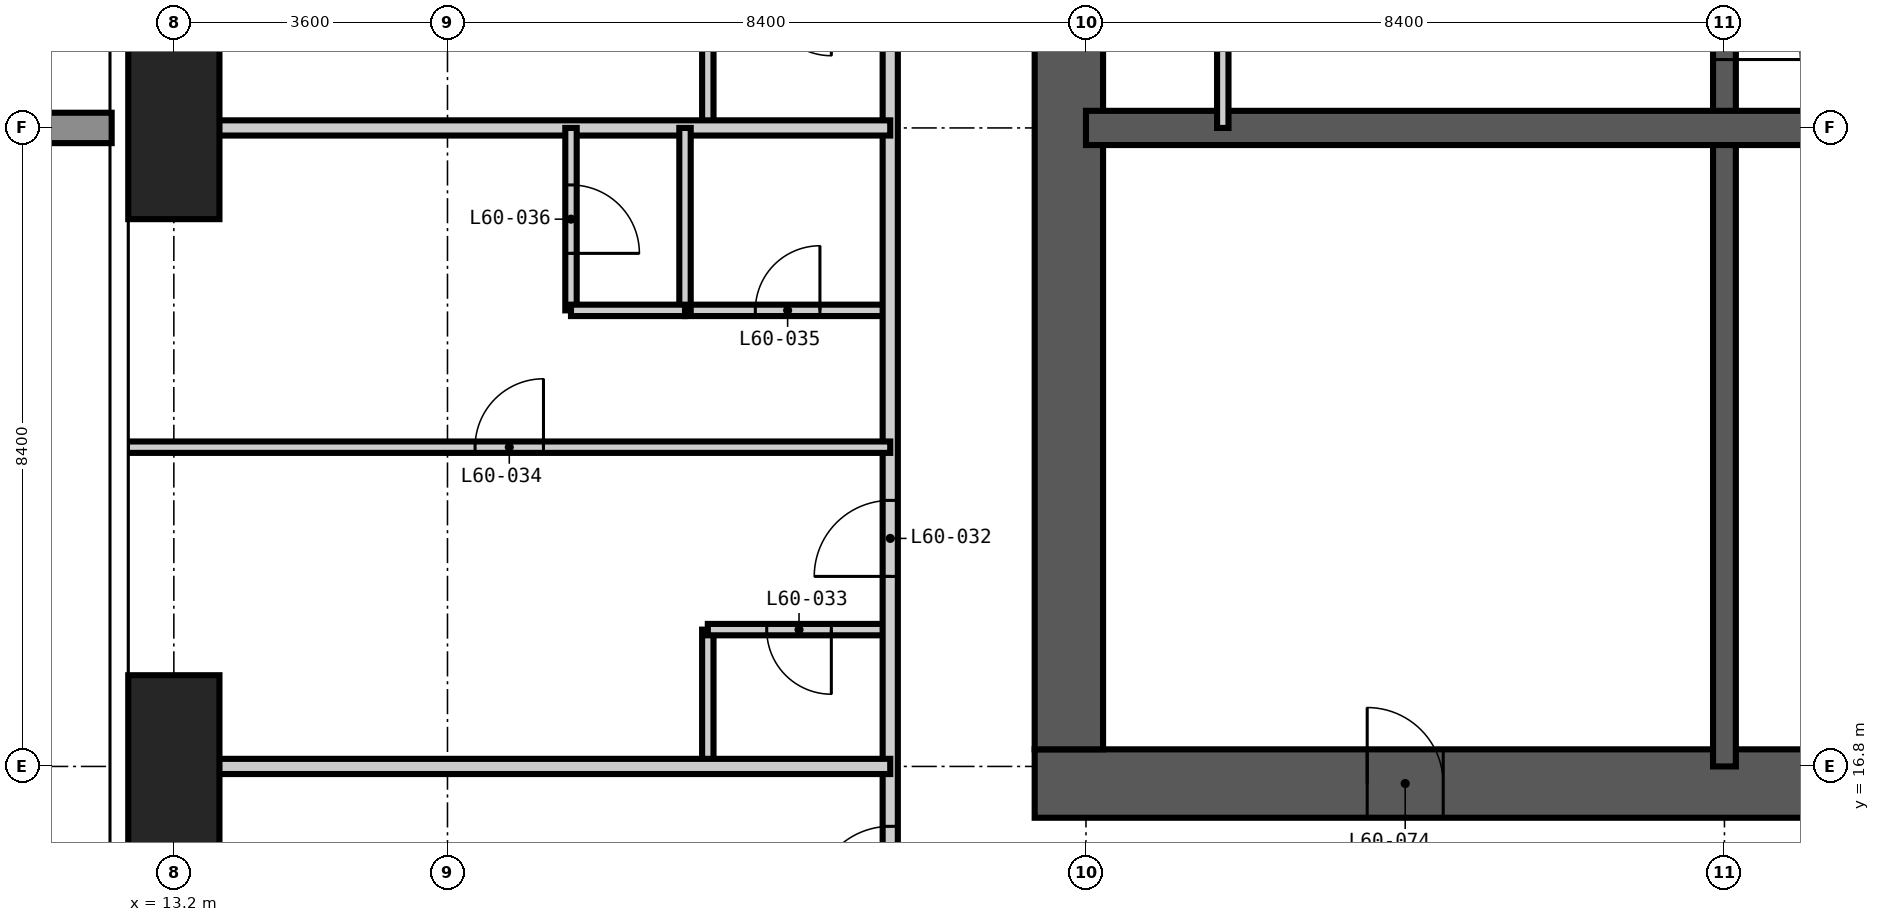
"""IFC4 building model, lengths in metres.
Left out: names, types, materials, properties, quantities, classifications, styles, units other than length and angle.
Written with IfcOpenShell. Run it as: python <this file> out.ifc"""

import sys

from ifc_helpers import new_model, si_unit, direction, frame, frame_2d, origin, origin_2d, place, context, subcontext, project, spatial, rectangle, extrude, element, fill, save


model = new_model("IFC4")
c1 = context("Model", 3, precision=1e-05, world=origin(), true_north=direction((0.0, 1.0)))
c2 = subcontext(c1, "Body", "Model", "MODEL_VIEW")
j1 = project(units=[si_unit("LENGTHUNIT", "METRE"), si_unit("PLANEANGLEUNIT", "RADIAN")], contexts=[c1])
p1 = place(None, origin())
s1 = spatial("IfcSite", under=j1, at=p1, CompositionType="ELEMENT")
p2 = place(p1, origin())
s2 = spatial("IfcBuilding", under=s1, at=p2, CompositionType="ELEMENT")
p3 = place(p2, frame((0.0, 0.0, 233.4)))
s3 = spatial("IfcBuildingStorey", under=s2, at=p3, CompositionType="ELEMENT", Elevation=233.4)
for number, where, z_axis, x_axis in (
    (1, (13.2, 16.8, -0.35), (0.0, 0.0, 1.0), (1.0, 0.0, 0.0)),
    (2, (13.2, 25.2, -0.35), (0.0, 0.0, 1.0), (1.0, 0.0, 0.0)),
):
    element("IfcColumn", number, at=place(p3, frame(where, z_axis=z_axis, x_axis=x_axis)), inside=s3, PredefinedType="COLUMN", context=c2, shape_type="SweptSolid", body=[
        extrude(rectangle(XDim=1.2, YDim=2.4, at=origin_2d()), origin(), (0.0, 0.0, 1.0), 3.9),
    ])
p4 = place(p3, frame((24.525, 16.575, -0.35), z_axis=(0.0, 0.0, 1.0), x_axis=(1.0, 0.0, 0.0)))
e3 = element("IfcWall", 3, at=p4, inside=s3, PredefinedType="SHEAR", context=c2, shape_type="SweptSolid", body=[
    extrude(rectangle(XDim=18.15, YDim=0.9, at=frame_2d((9.075, 0.0))), origin(), (0.0, 0.0, 1.0), 3.9),
])
p5 = place(p4, frame((4.375, 0.0, 0.35)))
e4 = element("IfcOpeningElement", 4, at=p5, cuts=e3, PredefinedType="OPENING", context=c2, shape_type="SweptSolid", body=[
    extrude(rectangle(XDim=1.0, YDim=2.1, at=frame_2d((0.5, 1.05))), frame((0.0, 0.46, 0.0), z_axis=(0.0, -1.0, 0.0), x_axis=(1.0, 0.0, 0.0)), (0.0, 0.0, 1.0), 0.92),
])
p6 = place(p4, frame((10.675, 0.0, 0.35)))
e5 = element("IfcOpeningElement", 5, at=p6, cuts=e3, PredefinedType="OPENING", context=c2, shape_type="SweptSolid", body=[
    extrude(rectangle(XDim=1.0, YDim=2.1, at=frame_2d((0.5, 1.05))), frame((0.0, 0.46, 0.0), z_axis=(0.0, -1.0, 0.0), x_axis=(1.0, 0.0, 0.0)), (0.0, 0.0, 1.0), 0.92),
])
p7 = place(p3, frame((24.975, 41.775, -0.35), z_axis=(0.0, 0.0, 1.0), x_axis=(0.0, -1.0, 0.0)))
e6 = element("IfcWall", 6, at=p7, inside=s3, PredefinedType="SHEAR", context=c2, shape_type="SweptSolid", body=[
    extrude(rectangle(XDim=24.75, YDim=0.9, at=frame_2d((12.375, 0.0))), origin(), (0.0, 0.0, 1.0), 3.9),
])
p8 = place(p7, frame((11.875, 0.0, 0.35)))
e7 = element("IfcOpeningElement", 7, at=p8, cuts=e6, PredefinedType="OPENING", context=c2, shape_type="SweptSolid", body=[
    extrude(rectangle(XDim=1.0, YDim=2.1, at=frame_2d((0.5, 1.05))), frame((0.0, 0.46, 0.0), z_axis=(0.0, -1.0, 0.0), x_axis=(1.0, 0.0, 0.0)), (0.0, 0.0, 1.0), 0.92),
])
p9 = place(p3, frame((33.6, 16.8, -0.35), z_axis=(0.0, 0.0, 1.0), x_axis=(0.0, 1.0, 0.0)))
e8 = element("IfcWall", 8, at=p9, inside=s3, PredefinedType="SHEAR", context=c2, shape_type="SweptSolid", body=[
    extrude(rectangle(XDim=25.2, YDim=0.3, at=frame_2d((12.6, 0.0))), origin(), (0.0, 0.0, 1.0), 3.9),
])
p10 = place(p9, frame((22.5, 0.0, 0.35)))
e9 = element("IfcOpeningElement", 9, at=p10, cuts=e8, PredefinedType="OPENING", context=c2, shape_type="SweptSolid", body=[
    extrude(rectangle(XDim=1.2, YDim=2.2, at=frame_2d((0.6, 1.1))), frame((0.0, 0.16, 0.0), z_axis=(0.0, -1.0, 0.0), x_axis=(1.0, 0.0, 0.0)), (0.0, 0.0, 1.0), 0.32),
])
p11 = place(p9, frame((18.3, 0.0, 0.35)))
e10 = element("IfcOpeningElement", 10, at=p11, cuts=e8, PredefinedType="OPENING", context=c2, shape_type="SweptSolid", body=[
    extrude(rectangle(XDim=1.2, YDim=2.2, at=frame_2d((0.6, 1.1))), frame((0.0, 0.16, 0.0), z_axis=(0.0, -1.0, 0.0), x_axis=(1.0, 0.0, 0.0)), (0.0, 0.0, 1.0), 0.32),
])
p12 = place(p9, frame((9.3, 0.0, 0.35)))
e11 = element("IfcOpeningElement", 11, at=p12, cuts=e8, PredefinedType="OPENING", context=c2, shape_type="SweptSolid", body=[
    extrude(rectangle(XDim=1.0, YDim=2.1, at=frame_2d((0.5, 1.05))), frame((0.0, 0.16, 0.0), z_axis=(0.0, -1.0, 0.0), x_axis=(1.0, 0.0, 0.0)), (0.0, 0.0, 1.0), 0.32),
])
p13 = place(p3, frame((25.2, 25.2, -0.35), z_axis=(0.0, 0.0, 1.0), x_axis=(1.0, 0.0, 0.0)))
e12 = element("IfcWall", 12, at=p13, inside=s3, PredefinedType="SHEAR", context=c2, shape_type="SweptSolid", body=[
    extrude(rectangle(XDim=16.8, YDim=0.45, at=frame_2d((8.4, 0.0))), origin(), (0.0, 0.0, 1.0), 3.9),
])
for number, where, z_axis, x_axis in (
    (13, (20.225, 16.8, 0.0), (0.0, 0.0, 1.0), (0.0, 1.0, 0.0)),
    (14, (20.225, 25.2, 0.0), (0.0, 0.0, 1.0), (0.0, 1.0, 0.0)),
):
    element("IfcWall", number, at=place(p3, frame(where, z_axis=z_axis, x_axis=x_axis)), inside=s3, PredefinedType="PARTITIONING", context=c2, shape_type="SweptSolid", body=[
        extrude(rectangle(XDim=1.8, YDim=0.15, at=frame_2d((0.9, 0.0))), origin(), (0.0, 0.0, 1.0), 3.55),
    ])
p14 = place(p3, frame((20.225, 18.6, 0.0), z_axis=(0.0, 0.0, 1.0), x_axis=(1.0, 0.0, 0.0)))
e15 = element("IfcWall", 15, at=p14, inside=s3, PredefinedType="PARTITIONING", context=c2, shape_type="SweptSolid", body=[
    extrude(rectangle(XDim=2.4, YDim=0.15, at=frame_2d((1.2, 0.0))), origin(), (0.0, 0.0, 1.0), 3.55),
])
p15 = place(p14, frame((0.775, 0.0, 0.0)))
e16 = element("IfcOpeningElement", 16, at=p15, cuts=e15, PredefinedType="OPENING", context=c2, shape_type="SweptSolid", body=[
    extrude(rectangle(XDim=0.85, YDim=2.1, at=frame_2d((0.425, 1.05))), frame((0.0, 0.085, 0.0), z_axis=(0.0, -1.0, 0.0), x_axis=(1.0, 0.0, 0.0)), (0.0, 0.0, 1.0), 0.17),
])
p16 = place(p3, frame((19.925, 22.8, 0.0), z_axis=(0.0, 0.0, 1.0), x_axis=(1.0, 0.0, 0.0)))
e17 = element("IfcWall", 17, at=p16, inside=s3, PredefinedType="PARTITIONING", context=c2, shape_type="SweptSolid", body=[
    extrude(rectangle(XDim=2.7, YDim=0.15, at=frame_2d((1.35, 0.0))), origin(), (0.0, 0.0, 1.0), 3.55),
])
p17 = place(p16, frame((0.925, 0.0, 0.0)))
e18 = element("IfcOpeningElement", 18, at=p17, cuts=e17, PredefinedType="OPENING", context=c2, shape_type="SweptSolid", body=[
    extrude(rectangle(XDim=0.85, YDim=2.1, at=frame_2d((0.425, 1.05))), frame((0.0, 0.085, 0.0), z_axis=(0.0, -1.0, 0.0), x_axis=(1.0, 0.0, 0.0)), (0.0, 0.0, 1.0), 0.17),
])
p18 = place(p3, frame((22.625, 14.225, 0.0), z_axis=(0.0, 0.0, 1.0), x_axis=(0.0, 1.0, 0.0)))
e19 = element("IfcWall", 19, at=p18, inside=s3, PredefinedType="PARTITIONING", context=c2, shape_type="SweptSolid", body=[
    extrude(rectangle(XDim=30.95, YDim=0.2, at=frame_2d((15.475, 0.0))), origin(), (0.0, 0.0, 1.0), 3.55),
])
p19 = place(p18, frame((5.075, 0.0, 0.0)))
e20 = element("IfcOpeningElement", 20, at=p19, cuts=e19, PredefinedType="OPENING", context=c2, shape_type="SweptSolid", body=[
    extrude(rectangle(XDim=1.0, YDim=2.2, at=frame_2d((0.5, 1.1))), frame((0.0, 0.11, 0.0), z_axis=(0.0, -1.0, 0.0), x_axis=(1.0, 0.0, 0.0)), (0.0, 0.0, 1.0), 0.22),
])
p20 = place(p18, frame((13.475, 0.0, 0.0)))
e21 = element("IfcOpeningElement", 21, at=p20, cuts=e19, PredefinedType="OPENING", context=c2, shape_type="SweptSolid", body=[
    extrude(rectangle(XDim=1.0, YDim=2.2, at=frame_2d((0.5, 1.1))), frame((0.0, 0.11, 0.0), z_axis=(0.0, -1.0, 0.0), x_axis=(1.0, 0.0, 0.0)), (0.0, 0.0, 1.0), 0.22),
])
p21 = place(p18, frame((21.875, 0.0, 0.0)))
e22 = element("IfcOpeningElement", 22, at=p21, cuts=e19, PredefinedType="OPENING", context=c2, shape_type="SweptSolid", body=[
    extrude(rectangle(XDim=1.0, YDim=2.2, at=frame_2d((0.5, 1.1))), frame((0.0, 0.11, 0.0), z_axis=(0.0, -1.0, 0.0), x_axis=(1.0, 0.0, 0.0)), (0.0, 0.0, 1.0), 0.22),
])
p22 = place(p18, frame((0.787, 0.0, 0.0)))
e23 = element("IfcOpeningElement", 23, at=p22, cuts=e19, PredefinedType="OPENING", context=c2, shape_type="SweptSolid", body=[
    extrude(rectangle(XDim=1.0, YDim=2.2, at=frame_2d((0.5, 1.1))), frame((0.0, 0.11, 0.0), z_axis=(0.0, -1.0, 0.0), x_axis=(1.0, 0.0, 0.0)), (0.0, 0.0, 1.0), 0.22),
])
p23 = place(p18, frame((28.862, 0.0, 0.0)))
e24 = element("IfcOpeningElement", 24, at=p23, cuts=e19, PredefinedType="OPENING", context=c2, shape_type="SweptSolid", body=[
    extrude(rectangle(XDim=1.0, YDim=2.2, at=frame_2d((0.5, 1.1))), frame((0.0, 0.11, 0.0), z_axis=(0.0, -1.0, 0.0), x_axis=(1.0, 0.0, 0.0)), (0.0, 0.0, 1.0), 0.22),
])
for number, where, z_axis, x_axis in (
    (25, (12.582, 16.8, 0.0), (0.0, 0.0, 1.0), (1.0, 0.0, 0.0)),
    (26, (12.582, 25.2, 0.0), (0.0, 0.0, 1.0), (1.0, 0.0, 0.0)),
):
    element("IfcWall", number, at=place(p3, frame(where, z_axis=z_axis, x_axis=x_axis)), inside=s3, PredefinedType="PARTITIONING", context=c2, shape_type="SweptSolid", body=[
        extrude(rectangle(XDim=10.043, YDim=0.2, at=frame_2d((5.021, 0.0))), origin(), (0.0, 0.0, 1.0), 3.55),
    ])
p24 = place(p3, frame((18.425, 22.8, 0.0), z_axis=(0.0, 0.0, 1.0), x_axis=(0.0, 1.0, 0.0)))
e27 = element("IfcWall", 27, at=p24, inside=s3, PredefinedType="PARTITIONING", context=c2, shape_type="SweptSolid", body=[
    extrude(rectangle(XDim=2.4, YDim=0.15, at=frame_2d((1.2, 0.0))), origin(), (0.0, 0.0, 1.0), 3.55),
])
p25 = place(p24, frame((0.75, 0.0, 0.0)))
e28 = element("IfcOpeningElement", 28, at=p25, cuts=e27, PredefinedType="OPENING", context=c2, shape_type="SweptSolid", body=[
    extrude(rectangle(XDim=0.9, YDim=2.1, at=frame_2d((0.45, 1.05))), frame((0.0, 0.085, 0.0), z_axis=(0.0, -1.0, 0.0), x_axis=(1.0, 0.0, 0.0)), (0.0, 0.0, 1.0), 0.17),
])
p26 = place(p3, frame((19.925, 22.8, 0.0), z_axis=(0.0, 0.0, 1.0), x_axis=(0.0, 1.0, 0.0)))
e29 = element("IfcWall", 29, at=p26, inside=s3, PredefinedType="PARTITIONING", context=c2, shape_type="SweptSolid", body=[
    extrude(rectangle(XDim=2.4, YDim=0.15, at=frame_2d((1.2, 0.0))), origin(), (0.0, 0.0, 1.0), 3.55),
])
p27 = place(p3, frame((27.0, 25.2, 0.0), z_axis=(0.0, 0.0, 1.0), x_axis=(0.0, 1.0, 0.0)))
e30 = element("IfcWall", 30, at=p27, inside=s3, PredefinedType="PARTITIONING", context=c2, shape_type="SweptSolid", body=[
    extrude(rectangle(XDim=8.4, YDim=0.15, at=frame_2d((4.2, 0.0))), origin(), (0.0, 0.0, 1.0), 3.55),
])
p28 = place(p27, frame((1.6, 0.0, 0.0)))
e31 = element("IfcOpeningElement", 31, at=p28, cuts=e30, PredefinedType="OPENING", context=c2, shape_type="SweptSolid", body=[
    extrude(rectangle(XDim=1.0, YDim=2.1, at=frame_2d((0.5, 1.05))), frame((0.0, 0.085, 0.0), z_axis=(0.0, -1.0, 0.0), x_axis=(1.0, 0.0, 0.0)), (0.0, 0.0, 1.0), 0.17),
])
p29 = place(p27, frame((5.8, 0.0, 0.0)))
e32 = element("IfcOpeningElement", 32, at=p29, cuts=e30, PredefinedType="OPENING", context=c2, shape_type="SweptSolid", body=[
    extrude(rectangle(XDim=1.0, YDim=2.1, at=frame_2d((0.5, 1.05))), frame((0.0, 0.085, 0.0), z_axis=(0.0, -1.0, 0.0), x_axis=(1.0, 0.0, 0.0)), (0.0, 0.0, 1.0), 0.17),
])
p30 = place(p3, frame((12.582, 21.0, 0.0), z_axis=(0.0, 0.0, 1.0), x_axis=(1.0, 0.0, 0.0)))
e33 = element("IfcWall", 33, at=p30, inside=s3, PredefinedType="PARTITIONING", context=c2, shape_type="SweptSolid", body=[
    extrude(rectangle(XDim=10.043, YDim=0.15, at=frame_2d((5.021, 0.0))), origin(), (0.0, 0.0, 1.0), 3.55),
])
p31 = place(p30, frame((4.581, 0.0, 0.0)))
e34 = element("IfcOpeningElement", 34, at=p31, cuts=e33, PredefinedType="OPENING", context=c2, shape_type="SweptSolid", body=[
    extrude(rectangle(XDim=0.9, YDim=2.1, at=frame_2d((0.45, 1.05))), frame((0.0, 0.085, 0.0), z_axis=(0.0, -1.0, 0.0), x_axis=(1.0, 0.0, 0.0)), (0.0, 0.0, 1.0), 0.17),
])
p32 = place(p3, frame((18.425, 22.8, 0.0), z_axis=(0.0, 0.0, 1.0), x_axis=(1.0, 0.0, 0.0)))
e35 = element("IfcWall", 35, at=p32, inside=s3, PredefinedType="PARTITIONING", context=c2, shape_type="SweptSolid", body=[
    extrude(rectangle(XDim=1.5, YDim=0.15, at=frame_2d((0.75, 0.0))), origin(), (0.0, 0.0, 1.0), 3.55),
])
p33 = place(p19, origin())
e36 = element("IfcDoor", 36, at=p33, inside=s3, OperationType="SINGLE_SWING_LEFT", PredefinedType="DOOR", context=c2, shape_type="SweptSolid", body=[
    extrude(rectangle(XDim=1.0, YDim=2.2, at=frame_2d((0.5, 1.1))), frame((0.0, 0.025, 0.0), z_axis=(0.0, -1.0, 0.0), x_axis=(1.0, 0.0, 0.0)), (0.0, 0.0, 1.0), 0.05),
])
fill(e20, e36)
p34 = place(p15, frame((0.85, 0.0, 0.0), z_axis=(0.0, 0.0, 1.0), x_axis=(-1.0, 0.0, 0.0)))
e37 = element("IfcDoor", 37, at=p34, inside=s3, OperationType="SINGLE_SWING_LEFT", PredefinedType="DOOR", context=c2, shape_type="SweptSolid", body=[
    extrude(rectangle(XDim=0.85, YDim=2.1, at=frame_2d((0.425, 1.05))), frame((0.0, 0.025, 0.0), z_axis=(0.0, -1.0, 0.0), x_axis=(1.0, 0.0, 0.0)), (0.0, 0.0, 1.0), 0.05),
])
fill(e16, e37)
p35 = place(p31, origin())
e38 = element("IfcDoor", 38, at=p35, inside=s3, OperationType="SINGLE_SWING_RIGHT", PredefinedType="DOOR", context=c2, shape_type="SweptSolid", body=[
    extrude(rectangle(XDim=0.9, YDim=2.1, at=frame_2d((0.45, 1.05))), frame((0.0, 0.025, 0.0), z_axis=(0.0, -1.0, 0.0), x_axis=(1.0, 0.0, 0.0)), (0.0, 0.0, 1.0), 0.05),
])
fill(e34, e38)
p36 = place(p17, origin())
e39 = element("IfcDoor", 39, at=p36, inside=s3, OperationType="SINGLE_SWING_RIGHT", PredefinedType="DOOR", context=c2, shape_type="SweptSolid", body=[
    extrude(rectangle(XDim=0.85, YDim=2.1, at=frame_2d((0.425, 1.05))), frame((0.0, 0.025, 0.0), z_axis=(0.0, -1.0, 0.0), x_axis=(1.0, 0.0, 0.0)), (0.0, 0.0, 1.0), 0.05),
])
fill(e18, e39)
p37 = place(p25, frame((0.9, 0.0, 0.0), z_axis=(0.0, 0.0, 1.0), x_axis=(-1.0, 0.0, 0.0)))
e40 = element("IfcDoor", 40, at=p37, inside=s3, OperationType="SINGLE_SWING_RIGHT", PredefinedType="DOOR", context=c2, shape_type="SweptSolid", body=[
    extrude(rectangle(XDim=0.9, YDim=2.1, at=frame_2d((0.45, 1.05))), frame((0.0, 0.025, 0.0), z_axis=(0.0, -1.0, 0.0), x_axis=(1.0, 0.0, 0.0)), (0.0, 0.0, 1.0), 0.05),
])
fill(e28, e40)
p38 = place(p22, origin())
e41 = element("IfcDoor", 41, at=p38, inside=s3, OperationType="SINGLE_SWING_LEFT", PredefinedType="DOOR", context=c2, shape_type="SweptSolid", body=[
    extrude(rectangle(XDim=1.0, YDim=2.2, at=frame_2d((0.5, 1.1))), frame((0.0, 0.025, 0.0), z_axis=(0.0, -1.0, 0.0), x_axis=(1.0, 0.0, 0.0)), (0.0, 0.0, 1.0), 0.05),
])
fill(e23, e41)
p39 = place(p12, frame((1.0, 0.0, 0.0), z_axis=(0.0, 0.0, 1.0), x_axis=(-1.0, 0.0, 0.0)))
e42 = element("IfcDoor", 42, at=p39, inside=s3, OperationType="SINGLE_SWING_RIGHT", PredefinedType="DOOR", context=c2, shape_type="SweptSolid", body=[
    extrude(rectangle(XDim=1.0, YDim=2.1, at=frame_2d((0.5, 1.05))), frame((0.0, 0.025, 0.0), z_axis=(0.0, -1.0, 0.0), x_axis=(1.0, 0.0, 0.0)), (0.0, 0.0, 1.0), 0.05),
])
fill(e11, e42)
p40 = place(p5, origin())
e43 = element("IfcDoor", 43, at=p40, inside=s3, OperationType="SINGLE_SWING_LEFT", PredefinedType="DOOR", context=c2, shape_type="SweptSolid", body=[
    extrude(rectangle(XDim=1.0, YDim=2.1, at=frame_2d((0.5, 1.05))), frame((0.0, 0.025, 0.0), z_axis=(0.0, -1.0, 0.0), x_axis=(1.0, 0.0, 0.0)), (0.0, 0.0, 1.0), 0.05),
])
fill(e4, e43)
save(model, sys.argv[1])
